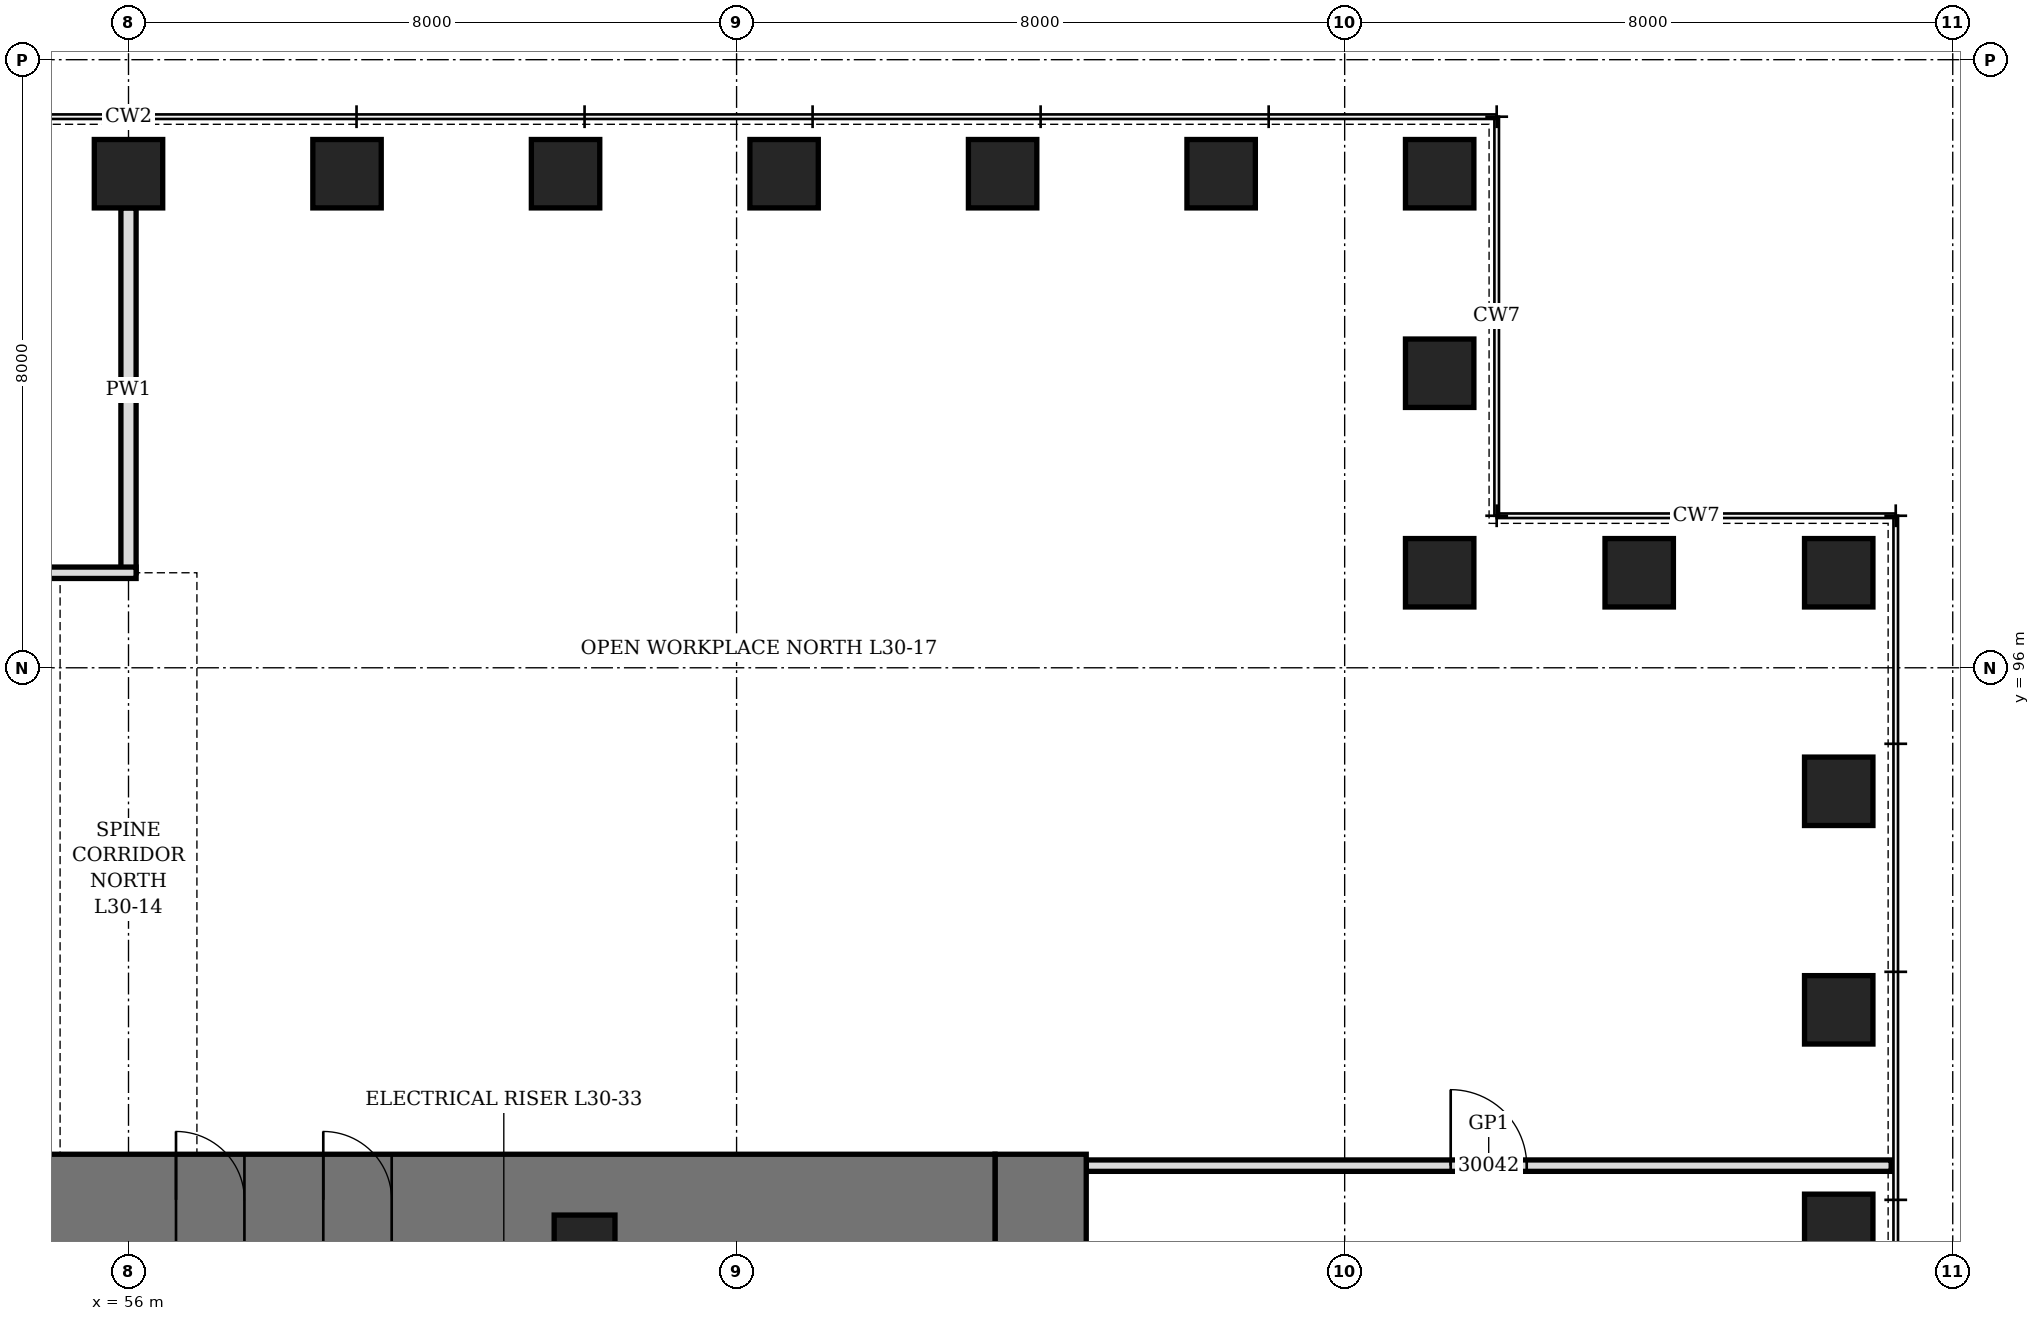
"""IFC4 building model, lengths in metres.
Left out: names, types, materials, properties, quantities, classifications, styles, units other than length and angle.
Written with IfcOpenShell. Run it as: python <this file> out.ifc"""

import sys

from ifc_helpers import new_model, si_unit, direction, frame, frame_2d, origin, origin_2d, place, context, subcontext, project, spatial, rectangle, hollow_rectangle, extrude, element, fill, save


model = new_model("IFC4")
c1 = context("Model", 3, precision=1e-05, world=origin(), true_north=direction((0.0, 1.0)))
c2 = subcontext(c1, "Body", "Model", "MODEL_VIEW")
j1 = project(units=[si_unit("LENGTHUNIT", "METRE"), si_unit("PLANEANGLEUNIT", "RADIAN")], contexts=[c1])
p1 = place(None, origin())
s1 = spatial("IfcSite", under=j1, at=p1, CompositionType="ELEMENT")
p2 = place(p1, origin())
s2 = spatial("IfcBuilding", under=s1, at=p2, CompositionType="ELEMENT")
p3 = place(p2, frame((0.0, 0.0, 137.5)))
s3 = spatial("IfcBuildingStorey", under=s2, at=p3, CompositionType="ELEMENT", Elevation=137.5)
for number, where, z_axis, x_axis in (
    (1, (78.5, 88.625, 0.0), (0.0, 0.0, 1.0), (0.0, 1.0, 0.0)),
    (2, (78.5, 91.5, 0.0), (0.0, 0.0, 1.0), (0.0, 1.0, 0.0)),
    (3, (78.5, 94.375, 0.0), (0.0, 0.0, 1.0), (0.0, 1.0, 0.0)),
    (4, (78.5, 97.25, 0.0), (0.0, 0.0, 1.0), (1.0, 0.0, 0.0)),
    (5, (75.875, 97.25, 0.0), (0.0, 0.0, 1.0), (1.0, 0.0, 0.0)),
    (6, (73.25, 97.25, 0.0), (0.0, 0.0, 1.0), (0.0, 1.0, 0.0)),
    (7, (73.25, 99.875, 0.0), (0.0, 0.0, 1.0), (0.0, 1.0, 0.0)),
    (8, (73.25, 102.5, 0.0), (0.0, 0.0, 1.0), (1.0, 0.0, 0.0)),
    (9, (70.375, 102.5, 0.0), (0.0, 0.0, 1.0), (1.0, 0.0, 0.0)),
    (10, (67.5, 102.5, 0.0), (0.0, 0.0, 1.0), (1.0, 0.0, 0.0)),
    (11, (64.625, 102.5, 0.0), (0.0, 0.0, 1.0), (1.0, 0.0, 0.0)),
    (12, (61.75, 102.5, 0.0), (0.0, 0.0, 1.0), (1.0, 0.0, 0.0)),
    (13, (58.875, 102.5, 0.0), (0.0, 0.0, 1.0), (1.0, 0.0, 0.0)),
    (14, (56.0, 102.5, 0.0), (0.0, 0.0, 1.0), (1.0, 0.0, 0.0)),
):
    element("IfcColumn", number, at=place(p3, frame(where, z_axis=z_axis, x_axis=x_axis)), inside=s3, PredefinedType="COLUMN", context=c2, shape_type="SweptSolid", body=[
        extrude(hollow_rectangle(XDim=0.9, YDim=0.9, WallThickness=0.15, at=origin_2d()), origin(), (0.0, 0.0, 1.0), 4.2),
    ])
p4 = place(p3, frame((68.0, 70.4, 0.0), z_axis=(0.0, 0.0, 1.0), x_axis=(0.0, 1.0, 0.0)))
e15 = element("IfcWall", 15, at=p4, inside=s3, PredefinedType="SHEAR", context=c2, shape_type="SweptSolid", body=[
    extrude(rectangle(XDim=19.2, YDim=1.2, at=frame_2d((9.6, 0.0))), origin(), (0.0, 0.0, 1.0), 4.2),
])
p5 = place(p4, frame((8.6, 0.0, 0.0)))
e16 = element("IfcOpeningElement", 16, at=p5, cuts=e15, PredefinedType="OPENING", context=c2, shape_type="SweptSolid", body=[
    extrude(rectangle(XDim=2.0, YDim=2.4, at=frame_2d((1.0, 1.2))), frame((0.0, 0.61, 0.0), z_axis=(0.0, -1.0, 0.0), x_axis=(1.0, 0.0, 0.0)), (0.0, 0.0, 1.0), 1.22),
])
p6 = place(p3, frame((44.6, 89.0, 0.0), z_axis=(0.0, 0.0, 1.0), x_axis=(1.0, 0.0, 0.0)))
e17 = element("IfcWall", 17, at=p6, inside=s3, PredefinedType="SHEAR", context=c2, shape_type="SweptSolid", body=[
    extrude(rectangle(XDim=22.8, YDim=1.2, at=frame_2d((11.4, 0.0))), origin(), (0.0, 0.0, 1.0), 4.2),
])
p7 = place(p6, frame((6.325, 0.0, 0.0)))
e18 = element("IfcOpeningElement", 18, at=p7, cuts=e17, PredefinedType="OPENING", context=c2, shape_type="SweptSolid", body=[
    extrude(rectangle(XDim=1.0, YDim=2.1, at=frame_2d((0.5, 1.05))), frame((0.0, 0.61, 0.0), z_axis=(0.0, -1.0, 0.0), x_axis=(1.0, 0.0, 0.0)), (0.0, 0.0, 1.0), 1.22),
])
p8 = place(p6, frame((9.25, 0.0, 0.0)))
e19 = element("IfcOpeningElement", 19, at=p8, cuts=e17, PredefinedType="OPENING", context=c2, shape_type="SweptSolid", body=[
    extrude(rectangle(XDim=0.9, YDim=2.1, at=frame_2d((0.45, 1.05))), frame((0.0, 0.61, 0.0), z_axis=(0.0, -1.0, 0.0), x_axis=(1.0, 0.0, 0.0)), (0.0, 0.0, 1.0), 1.22),
])
p9 = place(p6, frame((12.025, 0.0, 0.0)))
e20 = element("IfcOpeningElement", 20, at=p9, cuts=e17, PredefinedType="OPENING", context=c2, shape_type="SweptSolid", body=[
    extrude(rectangle(XDim=0.9, YDim=2.1, at=frame_2d((0.45, 1.05))), frame((0.0, 0.61, 0.0), z_axis=(0.0, -1.0, 0.0), x_axis=(1.0, 0.0, 0.0)), (0.0, 0.0, 1.0), 1.22),
])
p10 = place(p6, frame((13.962, 0.0, 0.0)))
e21 = element("IfcOpeningElement", 21, at=p10, cuts=e17, PredefinedType="OPENING", context=c2, shape_type="SweptSolid", body=[
    extrude(rectangle(XDim=0.9, YDim=2.1, at=frame_2d((0.45, 1.05))), frame((0.0, 0.61, 0.0), z_axis=(0.0, -1.0, 0.0), x_axis=(1.0, 0.0, 0.0)), (0.0, 0.0, 1.0), 1.22),
])
p11 = place(p3, frame((62.0, 88.4, 0.0), z_axis=(0.0, 0.0, 1.0), x_axis=(1.0, 0.0, 0.0)))
e22 = element("IfcColumn", 22, at=p11, inside=s3, PredefinedType="COLUMN", context=c2, shape_type="SweptSolid", body=[
    extrude(hollow_rectangle(XDim=0.8, YDim=0.8, WallThickness=0.1, at=origin_2d()), origin(), (0.0, 0.0, 1.0), 4.2),
])
p12 = place(p3, frame((56.0, 97.25, 0.0), z_axis=(0.0, 0.0, 1.0), x_axis=(0.0, 1.0, 0.0)))
e23 = element("IfcWall", 23, at=p12, inside=s3, PredefinedType="PARTITIONING", context=c2, shape_type="SweptSolid", body=[
    extrude(rectangle(XDim=4.8, YDim=0.2, at=frame_2d((2.4, 0.0))), origin(), (0.0, 0.0, 1.0), 3.278),
])
p13 = place(p3, frame((68.6, 89.45, 0.0), z_axis=(0.0, 0.0, 1.0), x_axis=(1.0, 0.0, 0.0)))
e24 = element("IfcWall", 24, at=p13, inside=s3, PredefinedType="PARTITIONING", context=c2, shape_type="SweptSolid", body=[
    extrude(rectangle(XDim=10.59, YDim=0.15, at=frame_2d((5.295, 0.0))), origin(), (0.0, 0.0, 1.0), 4.04),
])
p14 = place(p13, frame((4.795, 0.0, 0.0)))
e25 = element("IfcOpeningElement", 25, at=p14, cuts=e24, PredefinedType="OPENING", context=c2, shape_type="SweptSolid", body=[
    extrude(rectangle(XDim=1.0, YDim=2.4, at=frame_2d((0.5, 1.2))), frame((0.0, 0.085, 0.0), z_axis=(0.0, -1.0, 0.0), x_axis=(1.0, 0.0, 0.0)), (0.0, 0.0, 1.0), 0.17),
])
p15 = place(p3, frame((39.2, 97.25, 0.0), z_axis=(0.0, 0.0, 1.0), x_axis=(1.0, 0.0, 0.0)))
e26 = element("IfcWall", 26, at=p15, inside=s3, PredefinedType="PARTITIONING", context=c2, shape_type="SweptSolid", body=[
    extrude(rectangle(XDim=16.9, YDim=0.15, at=frame_2d((8.45, 0.0))), origin(), (0.0, 0.0, 1.0), 4.04),
])
p16 = place(p15, frame((0.488, 0.0, 0.0)))
e27 = element("IfcOpeningElement", 27, at=p16, cuts=e26, PredefinedType="OPENING", context=c2, shape_type="SweptSolid", body=[
    extrude(rectangle(XDim=1.0, YDim=2.4, at=frame_2d((0.5, 1.2))), frame((0.0, 0.085, 0.0), z_axis=(0.0, -1.0, 0.0), x_axis=(1.0, 0.0, 0.0)), (0.0, 0.0, 1.0), 0.17),
])
p17 = place(p15, frame((6.238, 0.0, 0.0)))
e28 = element("IfcOpeningElement", 28, at=p17, cuts=e26, PredefinedType="OPENING", context=c2, shape_type="SweptSolid", body=[
    extrude(rectangle(XDim=1.0, YDim=2.4, at=frame_2d((0.5, 1.2))), frame((0.0, 0.085, 0.0), z_axis=(0.0, -1.0, 0.0), x_axis=(1.0, 0.0, 0.0)), (0.0, 0.0, 1.0), 0.17),
])
p18 = place(p15, frame((11.988, 0.0, 0.0)))
e29 = element("IfcOpeningElement", 29, at=p18, cuts=e26, PredefinedType="OPENING", context=c2, shape_type="SweptSolid", body=[
    extrude(rectangle(XDim=1.0, YDim=2.4, at=frame_2d((0.5, 1.2))), frame((0.0, 0.085, 0.0), z_axis=(0.0, -1.0, 0.0), x_axis=(1.0, 0.0, 0.0)), (0.0, 0.0, 1.0), 0.17),
])
p19 = place(p9, origin())
e30 = element("IfcDoor", 30, at=p19, inside=s3, OperationType="SINGLE_SWING_LEFT", PredefinedType="DOOR", context=c2, shape_type="SweptSolid", body=[
    extrude(rectangle(XDim=0.9, YDim=2.1, at=frame_2d((0.45, 1.05))), frame((0.0, 0.35, 0.0), z_axis=(0.0, -1.0, 0.0), x_axis=(1.0, 0.0, 0.0)), (0.0, 0.0, 1.0), 0.7),
])
fill(e20, e30)
p20 = place(p10, origin())
e31 = element("IfcDoor", 31, at=p20, inside=s3, OperationType="SINGLE_SWING_LEFT", PredefinedType="DOOR", context=c2, shape_type="SweptSolid", body=[
    extrude(rectangle(XDim=0.9, YDim=2.1, at=frame_2d((0.45, 1.05))), frame((0.0, 0.35, 0.0), z_axis=(0.0, -1.0, 0.0), x_axis=(1.0, 0.0, 0.0)), (0.0, 0.0, 1.0), 0.7),
])
fill(e21, e31)
p21 = place(p14, origin())
e32 = element("IfcDoor", 32, at=p21, inside=s3, OperationType="SINGLE_SWING_RIGHT", PredefinedType="DOOR", context=c2, shape_type="SweptSolid", body=[
    extrude(rectangle(XDim=1.0, YDim=2.4, at=frame_2d((0.5, 1.2))), frame((0.0, 0.075, 0.0), z_axis=(0.0, -1.0, 0.0), x_axis=(1.0, 0.0, 0.0)), (0.0, 0.0, 1.0), 0.149),
])
fill(e25, e32)
save(model, sys.argv[1])
